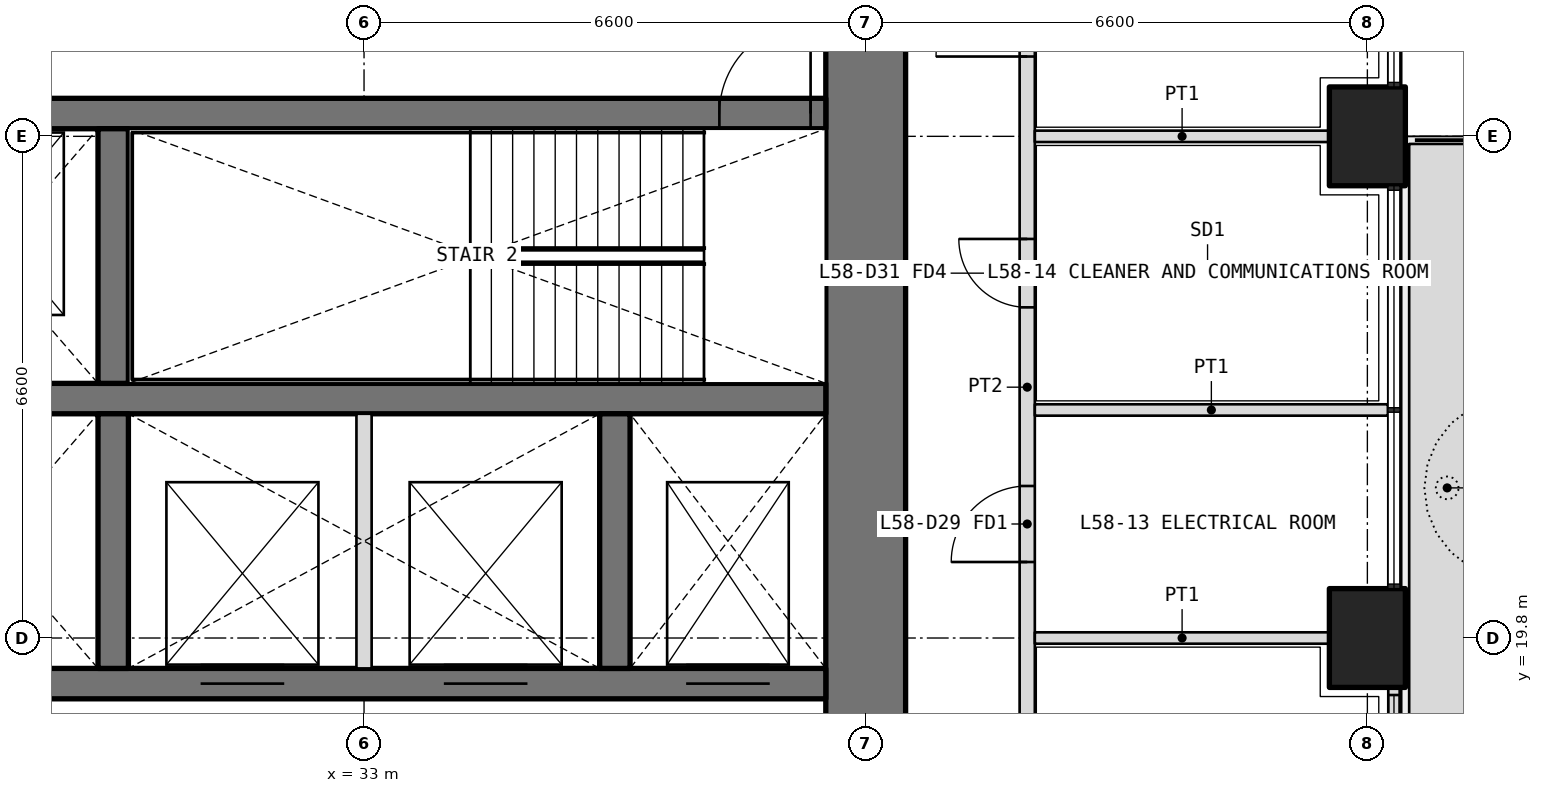
"""IFC4 building model, lengths in metres.
Left out: names, types, materials, properties, quantities, classifications, styles, units other than length and angle.
Written with IfcOpenShell. Run it as: python <this file> out.ifc"""

import sys

from ifc_helpers import new_model, si_unit, direction, frame, frame_2d, origin, origin_2d, place, context, subcontext, project, spatial, polyline, rectangle, outline, extrude, element, fill, save


model = new_model("IFC4")
c1 = context("Model", 3, precision=1e-05, world=origin(), true_north=direction((0.0, 1.0)))
c2 = subcontext(c1, "Body", "Model", "MODEL_VIEW")
j1 = project(units=[si_unit("LENGTHUNIT", "METRE"), si_unit("PLANEANGLEUNIT", "RADIAN")], contexts=[c1])
p1 = place(None, origin())
s1 = spatial("IfcSite", under=j1, at=p1, CompositionType="ELEMENT")
p2 = place(p1, origin())
s2 = spatial("IfcBuilding", under=s1, at=p2, CompositionType="ELEMENT")
p3 = place(p2, frame((0.0, 0.0, 254.4)))
s3 = spatial("IfcBuildingStorey", under=s2, at=p3, CompositionType="ELEMENT", Elevation=254.4)
for number, where, z_axis, x_axis in (
    (1, (46.2, 19.8, 0.0), (0.0, 0.0, 1.0), (0.0, 1.0, 0.0)),
    (2, (46.2, 26.4, 0.0), (0.0, 0.0, 1.0), (0.0, 1.0, 0.0)),
):
    element("IfcColumn", number, at=place(p3, frame(where, z_axis=z_axis, x_axis=x_axis)), inside=s3, PredefinedType="COLUMN", context=c2, shape_type="SweptSolid", body=[
        extrude(rectangle(XDim=1.3, YDim=1.0, at=origin_2d()), origin(), (0.0, 0.0, 1.0), 4.2),
    ])
p4 = place(p3, origin())
e3 = element("IfcWall", 3, at=p4, inside=s3, PredefinedType="USERDEFINED", context=c2, shape_type="SweptSolid", body=[
    extrude(outline(polyline([(46.75, 17.25), (47.75, 17.25), (47.75, 26.3), (46.75, 26.3), (46.75, 17.25)]), holes=[polyline([(46.9, 17.4), (47.6, 17.4), (47.6, 26.15), (46.9, 26.15), (46.9, 17.4)])]), origin(), (0.0, 0.0, 1.0), 1.05),
])
p5 = place(p3, frame((46.55, 13.85, 0.0), z_axis=(0.0, 0.0, 1.0), x_axis=(0.0, 1.0, 0.0)))
e4 = element("IfcWall", 4, at=p5, inside=s3, PredefinedType="SOLIDWALL", context=c2, shape_type="SweptSolid", body=[
    extrude(rectangle(XDim=5.3, YDim=0.15, at=frame_2d((2.65, 0.0))), origin(), (0.0, 0.0, 1.0), 2.7),
])
p6 = place(p5, frame((2.9, 0.0, 0.0)))
e5 = element("IfcOpeningElement", 5, at=p6, cuts=e4, PredefinedType="OPENING", context=c2, shape_type="SweptSolid", body=[
    extrude(rectangle(XDim=1.0, YDim=2.4, at=frame_2d((0.5, 1.2))), frame((0.0, 0.085, 0.0), z_axis=(0.0, -1.0, 0.0), x_axis=(1.0, 0.0, 0.0)), (0.0, 0.0, 1.0), 0.17),
])
p7 = place(p5, frame((0.1, 0.0, 0.1)))
e6 = element("IfcOpeningElement", 6, at=p7, cuts=e4, PredefinedType="OPENING", context=c2, shape_type="SweptSolid", body=[
    extrude(rectangle(XDim=2.3, YDim=2.3, at=frame_2d((1.15, 1.15))), frame((0.0, 0.085, 0.0), z_axis=(0.0, -1.0, 0.0), x_axis=(1.0, 0.0, 0.0)), (0.0, 0.0, 1.0), 0.17),
])
p8 = place(p5, frame((4.0, 0.0, 0.1)))
e7 = element("IfcOpeningElement", 7, at=p8, cuts=e4, PredefinedType="OPENING", context=c2, shape_type="SweptSolid", body=[
    extrude(rectangle(XDim=1.2, YDim=2.3, at=frame_2d((0.6, 1.15))), frame((0.0, 0.085, 0.0), z_axis=(0.0, -1.0, 0.0), x_axis=(1.0, 0.0, 0.0)), (0.0, 0.0, 1.0), 0.17),
])
p9 = place(p3, frame((39.6, 13.725, 0.0), z_axis=(0.0, 0.0, 1.0), x_axis=(0.0, 1.0, 0.0)))
e8 = element("IfcWall", 8, at=p9, inside=s3, PredefinedType="SHEAR", context=c2, shape_type="SweptSolid", body=[
    extrude(rectangle(XDim=18.75, YDim=1.05, at=frame_2d((9.375, 0.0))), origin(), (0.0, 0.0, 1.0), 4.2),
])
p10 = place(p9, frame((3.025, 0.0, 0.0)))
e9 = element("IfcOpeningElement", 9, at=p10, cuts=e8, PredefinedType="OPENING", context=c2, shape_type="SweptSolid", body=[
    extrude(rectangle(XDim=1.6, YDim=2.1, at=frame_2d((0.8, 1.05))), frame((0.0, 0.535, 0.0), z_axis=(0.0, -1.0, 0.0), x_axis=(1.0, 0.0, 0.0)), (0.0, 0.0, 1.0), 1.07),
])
p11 = place(p9, frame((13.825, 0.0, 0.0)))
e10 = element("IfcOpeningElement", 10, at=p11, cuts=e8, PredefinedType="OPENING", context=c2, shape_type="SweptSolid", body=[
    extrude(rectangle(XDim=1.6, YDim=2.1, at=frame_2d((0.8, 1.05))), frame((0.0, 0.535, 0.0), z_axis=(0.0, -1.0, 0.0), x_axis=(1.0, 0.0, 0.0)), (0.0, 0.0, 1.0), 1.07),
])
p12 = place(p3, frame((13.725, 19.2, 0.0), z_axis=(0.0, 0.0, 1.0), x_axis=(1.0, 0.0, 0.0)))
e11 = element("IfcWall", 11, at=p12, inside=s3, PredefinedType="SHEAR", context=c2, shape_type="SweptSolid", body=[
    extrude(rectangle(XDim=25.35, YDim=0.4, at=frame_2d((12.675, 0.0))), origin(), (0.0, 0.0, 1.0), 4.2),
])
p13 = place(p12, frame((10.575, 0.0, 0.0)))
e12 = element("IfcOpeningElement", 12, at=p13, cuts=e11, PredefinedType="OPENING", context=c2, shape_type="SweptSolid", body=[
    extrude(rectangle(XDim=0.9, YDim=2.1, at=frame_2d((0.45, 1.05))), frame((0.0, 0.21, 0.0), z_axis=(0.0, -1.0, 0.0), x_axis=(1.0, 0.0, 0.0)), (0.0, 0.0, 1.0), 0.42),
])
p14 = place(p12, frame((13.875, 0.0, 0.0)))
e13 = element("IfcOpeningElement", 13, at=p14, cuts=e11, PredefinedType="OPENING", context=c2, shape_type="SweptSolid", body=[
    extrude(rectangle(XDim=0.9, YDim=2.1, at=frame_2d((0.45, 1.05))), frame((0.0, 0.21, 0.0), z_axis=(0.0, -1.0, 0.0), x_axis=(1.0, 0.0, 0.0)), (0.0, 0.0, 1.0), 0.42),
])
p15 = place(p12, frame((0.2, 0.0, 0.0)))
e14 = element("IfcOpeningElement", 14, at=p15, cuts=e11, PredefinedType="OPENING", context=c2, shape_type="SweptSolid", body=[
    extrude(rectangle(XDim=1.2, YDim=2.1, at=frame_2d((0.6, 1.05))), frame((0.0, 0.21, 0.0), z_axis=(0.0, -1.0, 0.0), x_axis=(1.0, 0.0, 0.0)), (0.0, 0.0, 1.0), 0.42),
])
p16 = place(p12, frame((23.512, 0.0, 0.0)))
e15 = element("IfcOpeningElement", 15, at=p16, cuts=e11, PredefinedType="OPENING", context=c2, shape_type="SweptSolid", body=[
    extrude(rectangle(XDim=1.1, YDim=2.1, at=frame_2d((0.55, 1.05))), frame((0.0, 0.21, 0.0), z_axis=(0.0, -1.0, 0.0), x_axis=(1.0, 0.0, 0.0)), (0.0, 0.0, 1.0), 0.42),
])
p17 = place(p12, frame((17.125, 0.0, 0.0)))
e16 = element("IfcOpeningElement", 16, at=p17, cuts=e11, PredefinedType="OPENING", context=c2, shape_type="SweptSolid", body=[
    extrude(rectangle(XDim=1.1, YDim=2.1, at=frame_2d((0.55, 1.05))), frame((0.0, 0.21, 0.0), z_axis=(0.0, -1.0, 0.0), x_axis=(1.0, 0.0, 0.0)), (0.0, 0.0, 1.0), 0.42),
])
p18 = place(p12, frame((20.325, 0.0, 0.0)))
e17 = element("IfcOpeningElement", 17, at=p18, cuts=e11, PredefinedType="OPENING", context=c2, shape_type="SweptSolid", body=[
    extrude(rectangle(XDim=1.1, YDim=2.1, at=frame_2d((0.55, 1.05))), frame((0.0, 0.21, 0.0), z_axis=(0.0, -1.0, 0.0), x_axis=(1.0, 0.0, 0.0)), (0.0, 0.0, 1.0), 0.42),
])
p19 = place(p3, frame((13.725, 22.95, 0.0), z_axis=(0.0, 0.0, 1.0), x_axis=(1.0, 0.0, 0.0)))
e18 = element("IfcWall", 18, at=p19, inside=s3, PredefinedType="SHEAR", context=c2, shape_type="SweptSolid", body=[
    extrude(rectangle(XDim=25.35, YDim=0.4, at=frame_2d((12.675, 0.0))), origin(), (0.0, 0.0, 1.0), 4.2),
])
p20 = place(p3, frame((13.725, 26.7, 0.0), z_axis=(0.0, 0.0, 1.0), x_axis=(1.0, 0.0, 0.0)))
e19 = element("IfcWall", 19, at=p20, inside=s3, PredefinedType="SHEAR", context=c2, shape_type="SweptSolid", body=[
    extrude(rectangle(XDim=25.35, YDim=0.4, at=frame_2d((12.675, 0.0))), origin(), (0.0, 0.0, 1.0), 4.2),
])
p21 = place(p20, frame((23.95, 0.0, 0.0)))
e20 = element("IfcOpeningElement", 20, at=p21, cuts=e19, PredefinedType="OPENING", context=c2, shape_type="SweptSolid", body=[
    extrude(rectangle(XDim=1.2, YDim=2.1, at=frame_2d((0.6, 1.05))), frame((0.0, 0.21, 0.0), z_axis=(0.0, -1.0, 0.0), x_axis=(1.0, 0.0, 0.0)), (0.0, 0.0, 1.0), 0.42),
])
p22 = place(p20, frame((0.738, 0.0, 0.0)))
e21 = element("IfcOpeningElement", 21, at=p22, cuts=e19, PredefinedType="OPENING", context=c2, shape_type="SweptSolid", body=[
    extrude(rectangle(XDim=1.1, YDim=2.1, at=frame_2d((0.55, 1.05))), frame((0.0, 0.21, 0.0), z_axis=(0.0, -1.0, 0.0), x_axis=(1.0, 0.0, 0.0)), (0.0, 0.0, 1.0), 0.42),
])
p23 = place(p20, frame((3.925, 0.0, 0.0)))
e22 = element("IfcOpeningElement", 22, at=p23, cuts=e19, PredefinedType="OPENING", context=c2, shape_type="SweptSolid", body=[
    extrude(rectangle(XDim=1.1, YDim=2.1, at=frame_2d((0.55, 1.05))), frame((0.0, 0.21, 0.0), z_axis=(0.0, -1.0, 0.0), x_axis=(1.0, 0.0, 0.0)), (0.0, 0.0, 1.0), 0.42),
])
p24 = place(p20, frame((7.175, 0.0, 0.0)))
e23 = element("IfcOpeningElement", 23, at=p24, cuts=e19, PredefinedType="OPENING", context=c2, shape_type="SweptSolid", body=[
    extrude(rectangle(XDim=1.1, YDim=2.1, at=frame_2d((0.55, 1.05))), frame((0.0, 0.21, 0.0), z_axis=(0.0, -1.0, 0.0), x_axis=(1.0, 0.0, 0.0)), (0.0, 0.0, 1.0), 0.42),
])
p25 = place(p20, frame((10.425, 0.0, 0.0)))
e24 = element("IfcOpeningElement", 24, at=p25, cuts=e19, PredefinedType="OPENING", context=c2, shape_type="SweptSolid", body=[
    extrude(rectangle(XDim=1.1, YDim=2.1, at=frame_2d((0.55, 1.05))), frame((0.0, 0.21, 0.0), z_axis=(0.0, -1.0, 0.0), x_axis=(1.0, 0.0, 0.0)), (0.0, 0.0, 1.0), 0.42),
])
p26 = place(p20, frame((13.775, 0.0, 0.0)))
e25 = element("IfcOpeningElement", 25, at=p26, cuts=e19, PredefinedType="OPENING", context=c2, shape_type="SweptSolid", body=[
    extrude(rectangle(XDim=1.1, YDim=2.1, at=frame_2d((0.55, 1.05))), frame((0.0, 0.21, 0.0), z_axis=(0.0, -1.0, 0.0), x_axis=(1.0, 0.0, 0.0)), (0.0, 0.0, 1.0), 0.42),
])
for number, where, z_axis, x_axis in (
    (26, (29.7, 19.4, 0.0), (0.0, 0.0, 1.0), (0.0, 1.0, 0.0)),
    (27, (36.3, 19.4, 0.0), (0.0, 0.0, 1.0), (0.0, 1.0, 0.0)),
    (28, (29.7, 23.15, 0.0), (0.0, 0.0, 1.0), (0.0, 1.0, 0.0)),
):
    element("IfcWall", number, at=place(p3, frame(where, z_axis=z_axis, x_axis=x_axis)), inside=s3, PredefinedType="SHEAR", context=c2, shape_type="SweptSolid", body=[
        extrude(rectangle(XDim=3.35, YDim=0.4, at=frame_2d((1.675, 0.0))), origin(), (0.0, 0.0, 1.0), 4.2),
    ])
p27 = place(p3, frame((33.0, 19.4, 0.0), z_axis=(0.0, 0.0, 1.0), x_axis=(0.0, 1.0, 0.0)))
e29 = element("IfcWall", 29, at=p27, inside=s3, PredefinedType="PARTITIONING", context=c2, shape_type="SweptSolid", body=[
    extrude(rectangle(XDim=3.35, YDim=0.2, at=frame_2d((1.675, 0.0))), origin(), (0.0, 0.0, 1.0), 4.2),
])
p28 = place(p3, frame((41.725, 7.4, 0.0), z_axis=(0.0, 0.0, 1.0), x_axis=(0.0, 1.0, 0.0)))
e30 = element("IfcWall", 30, at=p28, inside=s3, PredefinedType="PARTITIONING", context=c2, shape_type="SweptSolid", body=[
    extrude(rectangle(XDim=31.4, YDim=0.2, at=frame_2d((15.7, 0.0))), origin(), (0.0, 0.0, 1.0), 3.0),
])
p29 = place(p28, frame((4.0, 0.0, 0.0)))
e31 = element("IfcOpeningElement", 31, at=p29, cuts=e30, PredefinedType="OPENING", context=c2, shape_type="SweptSolid", body=[
    extrude(rectangle(XDim=1.0, YDim=2.1, at=frame_2d((0.5, 1.05))), frame((0.0, 0.11, 0.0), z_axis=(0.0, -1.0, 0.0), x_axis=(1.0, 0.0, 0.0)), (0.0, 0.0, 1.0), 0.22),
])
p30 = place(p28, frame((10.25, 0.0, 0.0)))
e32 = element("IfcOpeningElement", 32, at=p30, cuts=e30, PredefinedType="OPENING", context=c2, shape_type="SweptSolid", body=[
    extrude(rectangle(XDim=1.0, YDim=2.1, at=frame_2d((0.5, 1.05))), frame((0.0, 0.11, 0.0), z_axis=(0.0, -1.0, 0.0), x_axis=(1.0, 0.0, 0.0)), (0.0, 0.0, 1.0), 0.22),
])
p31 = place(p28, frame((13.4, 0.0, 0.0)))
e33 = element("IfcOpeningElement", 33, at=p31, cuts=e30, PredefinedType="OPENING", context=c2, shape_type="SweptSolid", body=[
    extrude(rectangle(XDim=1.0, YDim=2.1, at=frame_2d((0.5, 1.05))), frame((0.0, 0.11, 0.0), z_axis=(0.0, -1.0, 0.0), x_axis=(1.0, 0.0, 0.0)), (0.0, 0.0, 1.0), 0.22),
])
p32 = place(p28, frame((16.75, 0.0, 0.0)))
e34 = element("IfcOpeningElement", 34, at=p32, cuts=e30, PredefinedType="OPENING", context=c2, shape_type="SweptSolid", body=[
    extrude(rectangle(XDim=0.9, YDim=2.1, at=frame_2d((0.45, 1.05))), frame((0.0, 0.11, 0.0), z_axis=(0.0, -1.0, 0.0), x_axis=(1.0, 0.0, 0.0)), (0.0, 0.0, 1.0), 0.22),
])
p33 = place(p28, frame((20.05, 0.0, 0.0)))
e35 = element("IfcOpeningElement", 35, at=p33, cuts=e30, PredefinedType="OPENING", context=c2, shape_type="SweptSolid", body=[
    extrude(rectangle(XDim=1.2, YDim=2.1, at=frame_2d((0.6, 1.05))), frame((0.0, 0.11, 0.0), z_axis=(0.0, -1.0, 0.0), x_axis=(1.0, 0.0, 0.0)), (0.0, 0.0, 1.0), 0.22),
])
p34 = place(p28, frame((26.3, 0.0, 0.0)))
e36 = element("IfcOpeningElement", 36, at=p34, cuts=e30, PredefinedType="OPENING", context=c2, shape_type="SweptSolid", body=[
    extrude(rectangle(XDim=1.2, YDim=2.1, at=frame_2d((0.6, 1.05))), frame((0.0, 0.11, 0.0), z_axis=(0.0, -1.0, 0.0), x_axis=(1.0, 0.0, 0.0)), (0.0, 0.0, 1.0), 0.22),
])
p35 = place(p3, frame((46.47, 22.8, 0.0), z_axis=(0.0, 0.0, 1.0), x_axis=(-1.0, 0.0, 0.0)))
e37 = element("IfcWall", 37, at=p35, inside=s3, PredefinedType="PARTITIONING", context=c2, shape_type="SweptSolid", body=[
    extrude(rectangle(XDim=4.645, YDim=0.15, at=frame_2d((2.323, 0.0))), origin(), (0.0, 0.0, 1.0), 2.7),
])
for number, where, z_axis, x_axis in (
    (38, (45.7, 26.4, 0.0), (0.0, 0.0, 1.0), (-1.0, 0.0, 0.0)),
    (39, (45.7, 19.8, 0.0), (0.0, 0.0, 1.0), (-1.0, 0.0, 0.0)),
):
    element("IfcWall", number, at=place(p3, frame(where, z_axis=z_axis, x_axis=x_axis)), inside=s3, PredefinedType="PARTITIONING", context=c2, shape_type="SweptSolid", body=[
        extrude(rectangle(XDim=3.875, YDim=0.15, at=frame_2d((1.938, 0.0))), origin(), (0.0, 0.0, 1.0), 3.0),
    ])
p36 = place(p8, origin())
e40 = element("IfcWindow", 40, at=p36, inside=s3, PartitioningType="SINGLE_PANEL", PredefinedType="WINDOW", context=c2, shape_type="SweptSolid", body=[
    extrude(rectangle(XDim=1.2, YDim=2.3, at=frame_2d((0.6, 1.15))), frame((0.0, 0.03, 0.0), z_axis=(0.0, -1.0, 0.0), x_axis=(1.0, 0.0, 0.0)), (0.0, 0.0, 1.0), 0.06),
])
fill(e7, e40)
p37 = place(p31, origin())
e41 = element("IfcDoor", 41, at=p37, inside=s3, OperationType="SINGLE_SWING_LEFT", PredefinedType="DOOR", context=c2, shape_type="SweptSolid", body=[
    extrude(rectangle(XDim=1.0, YDim=2.1, at=frame_2d((0.5, 1.05))), frame((0.0, 0.025, 0.0), z_axis=(0.0, -1.0, 0.0), x_axis=(1.0, 0.0, 0.0)), (0.0, 0.0, 1.0), 0.05),
])
fill(e33, e41)
p38 = place(p32, origin())
e42 = element("IfcDoor", 42, at=p38, inside=s3, OperationType="SINGLE_SWING_RIGHT", PredefinedType="DOOR", context=c2, shape_type="SweptSolid", body=[
    extrude(rectangle(XDim=0.9, YDim=2.1, at=frame_2d((0.45, 1.05))), frame((0.0, 0.025, 0.0), z_axis=(0.0, -1.0, 0.0), x_axis=(1.0, 0.0, 0.0)), (0.0, 0.0, 1.0), 0.05),
])
fill(e34, e42)
p39 = place(p33, origin())
e43 = element("IfcDoor", 43, at=p39, inside=s3, OperationType="DOUBLE_DOOR_SINGLE_SWING", PredefinedType="DOOR", context=c2, shape_type="SweptSolid", body=[
    extrude(rectangle(XDim=1.2, YDim=2.1, at=frame_2d((0.6, 1.05))), frame((0.0, 0.025, 0.0), z_axis=(0.0, -1.0, 0.0), x_axis=(1.0, 0.0, 0.0)), (0.0, 0.0, 1.0), 0.05),
])
fill(e35, e43)
p40 = place(p21, origin())
e44 = element("IfcDoor", 44, at=p40, inside=s3, OperationType="SINGLE_SWING_RIGHT", PredefinedType="DOOR", context=c2, shape_type="SweptSolid", body=[
    extrude(rectangle(XDim=1.2, YDim=2.1, at=frame_2d((0.6, 1.05))), frame((0.0, 0.025, 0.0), z_axis=(0.0, -1.0, 0.0), x_axis=(1.0, 0.0, 0.0)), (0.0, 0.0, 1.0), 0.05),
])
fill(e20, e44)
p41 = place(p16, origin())
e45 = element("IfcDoor", 45, at=p41, inside=s3, OperationType="DOUBLE_DOOR_SLIDING", PredefinedType="DOOR", context=c2, shape_type="SweptSolid", body=[
    extrude(rectangle(XDim=1.1, YDim=2.1, at=frame_2d((0.55, 1.05))), frame((0.0, 0.025, 0.0), z_axis=(0.0, -1.0, 0.0), x_axis=(1.0, 0.0, 0.0)), (0.0, 0.0, 1.0), 0.05),
])
fill(e15, e45)
p42 = place(p17, origin())
e46 = element("IfcDoor", 46, at=p42, inside=s3, OperationType="DOUBLE_DOOR_SLIDING", PredefinedType="DOOR", context=c2, shape_type="SweptSolid", body=[
    extrude(rectangle(XDim=1.1, YDim=2.1, at=frame_2d((0.55, 1.05))), frame((0.0, 0.025, 0.0), z_axis=(0.0, -1.0, 0.0), x_axis=(1.0, 0.0, 0.0)), (0.0, 0.0, 1.0), 0.05),
])
fill(e16, e46)
p43 = place(p18, origin())
e47 = element("IfcDoor", 47, at=p43, inside=s3, OperationType="DOUBLE_DOOR_SLIDING", PredefinedType="DOOR", context=c2, shape_type="SweptSolid", body=[
    extrude(rectangle(XDim=1.1, YDim=2.1, at=frame_2d((0.55, 1.05))), frame((0.0, 0.025, 0.0), z_axis=(0.0, -1.0, 0.0), x_axis=(1.0, 0.0, 0.0)), (0.0, 0.0, 1.0), 0.05),
])
fill(e17, e47)
save(model, sys.argv[1])
